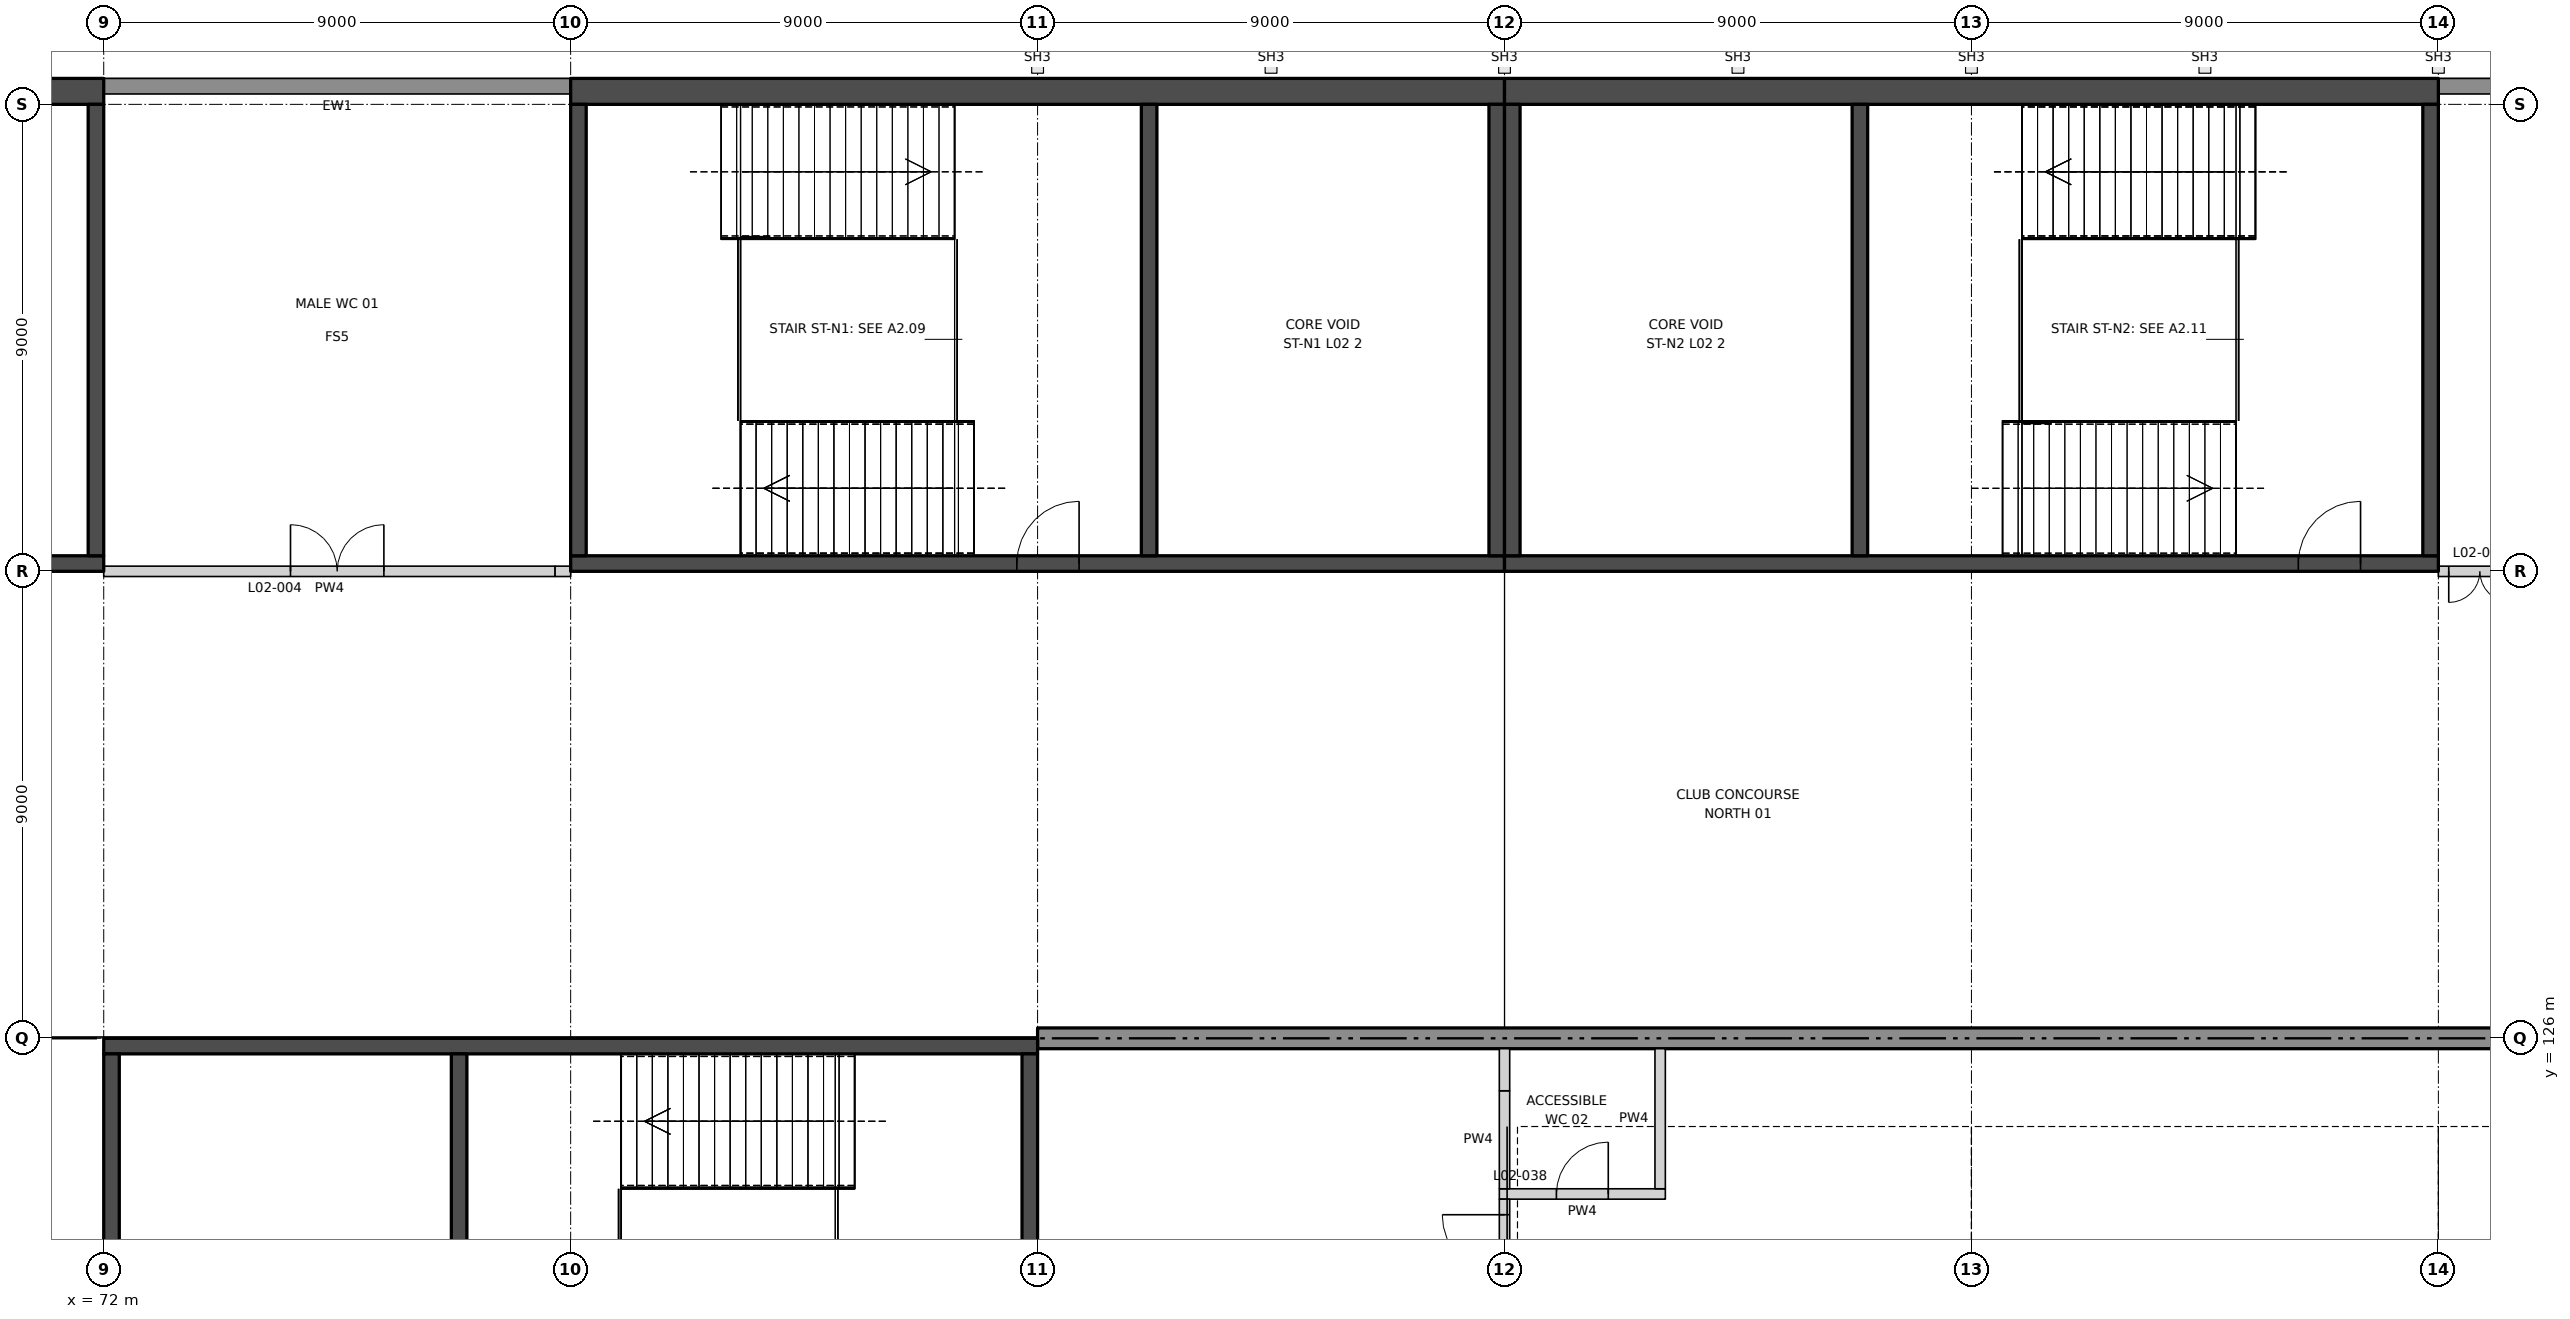
"""IFC4 building model, lengths in metres.
Left out: names, types, materials, properties, quantities, classifications, styles, units other than length and angle.
Written with IfcOpenShell. Run it as: python <this file> out.ifc"""

import sys

from ifc_helpers import new_model, si_unit, direction, frame, frame_2d, origin, place, context, subcontext, project, spatial, polyline, rectangle, outline, extrude, element, fill, save


model = new_model("IFC4")
c1 = context("Model", 3, precision=1e-05, world=origin(), true_north=direction((0.0, 1.0)))
c2 = subcontext(c1, "Body", "Model", "MODEL_VIEW")
j1 = project(units=[si_unit("LENGTHUNIT", "METRE"), si_unit("PLANEANGLEUNIT", "RADIAN")], contexts=[c1])
p1 = place(None, origin())
s1 = spatial("IfcSite", under=j1, at=p1, CompositionType="ELEMENT")
p2 = place(p1, origin())
s2 = spatial("IfcBuilding", under=s1, at=p2, CompositionType="ELEMENT")
p3 = place(p2, frame((0.0, 0.0, 11.5)))
s3 = spatial("IfcBuildingStorey", under=s2, at=p3, CompositionType="ELEMENT", Elevation=11.5)
p4 = place(p3, frame((171.0, 126.0, 0.0), z_axis=(0.0, 0.0, 1.0), x_axis=(-1.0, 0.0, 0.0)))
e1 = element("IfcWall", 1, at=p4, inside=s3, PredefinedType="SOLIDWALL", context=c2, shape_type="SweptSolid", body=[
    extrude(rectangle(XDim=81.0, YDim=0.4, at=frame_2d((40.5, 0.0))), origin(), (0.0, 0.0, 1.0), 10.5),
])
p5 = place(p3, frame((98.9, 123.0, 0.0), z_axis=(0.0, 0.0, 1.0), x_axis=(1.0, 0.0, 0.0)))
e2 = element("IfcWall", 2, at=p5, inside=s3, PredefinedType="PARTITIONING", context=c2, shape_type="SweptSolid", body=[
    extrude(outline(polyline([(0.0, 0.0), (3.2, 0.0), (3.2, 9.508), (0.457, 9.508), (0.0, 10.5), (0.0, 0.0)])), frame((0.0, 0.1, 0.0), z_axis=(0.0, -1.0, 0.0), x_axis=(1.0, 0.0, 0.0)), (0.0, 0.0, 1.0), 0.2),
])
p6 = place(p5, frame((1.1, 0.0, 0.0)))
e3 = element("IfcOpeningElement", 3, at=p6, cuts=e2, PredefinedType="OPENING", context=c2, shape_type="SweptSolid", body=[
    extrude(rectangle(XDim=1.0, YDim=2.1, at=frame_2d((0.5, 1.05))), frame((0.0, 0.11, 0.0), z_axis=(0.0, -1.0, 0.0), x_axis=(1.0, 0.0, 0.0)), (0.0, 0.0, 1.0), 0.22),
])
p7 = place(p3, frame((72.0, 135.0, 0.0), z_axis=(0.0, 0.0, 1.0), x_axis=(1.0, 0.0, 0.0)))
e4 = element("IfcWall", 4, at=p7, inside=s3, PredefinedType="PARTITIONING", context=c2, shape_type="SweptSolid", body=[
    extrude(rectangle(XDim=8.7, YDim=0.2, at=frame_2d((4.35, 0.0))), origin(), (0.0, 0.0, 1.0), 9.15),
])
p8 = place(p7, frame((3.6, 0.0, 0.0)))
e5 = element("IfcOpeningElement", 5, at=p8, cuts=e4, PredefinedType="OPENING", context=c2, shape_type="SweptSolid", body=[
    extrude(rectangle(XDim=1.8, YDim=2.1, at=frame_2d((0.9, 1.05))), frame((0.0, 0.11, 0.0), z_axis=(0.0, -1.0, 0.0), x_axis=(1.0, 0.0, 0.0)), (0.0, 0.0, 1.0), 0.22),
])
p9 = place(p3, frame((117.0, 135.0, 0.0), z_axis=(0.0, 0.0, 1.0), x_axis=(1.0, 0.0, 0.0)))
e6 = element("IfcWall", 6, at=p9, inside=s3, PredefinedType="PARTITIONING", context=c2, shape_type="SweptSolid", body=[
    extrude(rectangle(XDim=8.6, YDim=0.2, at=frame_2d((4.3, 0.0))), origin(), (0.0, 0.0, 1.0), 9.25),
])
p10 = place(p9, frame((0.2, 0.0, 0.0)))
e7 = element("IfcOpeningElement", 7, at=p10, cuts=e6, PredefinedType="OPENING", context=c2, shape_type="SweptSolid", body=[
    extrude(rectangle(XDim=1.2, YDim=2.1, at=frame_2d((0.6, 1.05))), frame((0.0, 0.11, 0.0), z_axis=(0.0, -1.0, 0.0), x_axis=(1.0, 0.0, 0.0)), (0.0, 0.0, 1.0), 0.22),
])
p11 = place(p3, frame((99.0, 121.1, 0.0), z_axis=(0.0, 0.0, 1.0), x_axis=(0.0, 1.0, 0.0)))
e8 = element("IfcWall", 8, at=p11, inside=s3, PredefinedType="PARTITIONING", context=c2, shape_type="SweptSolid", body=[
    extrude(rectangle(XDim=1.8, YDim=0.2, at=frame_2d((0.9, 0.0))), origin(), (0.0, 0.0, 1.0), 4.439),
])
p12 = place(p11, frame((0.3, 0.0, 0.0)))
e9 = element("IfcOpeningElement", 9, at=p12, cuts=e8, PredefinedType="OPENING", context=c2, shape_type="SweptSolid", body=[
    extrude(rectangle(XDim=1.2, YDim=2.1, at=frame_2d((0.6, 1.05))), frame((0.0, 0.11, 0.0), z_axis=(0.0, -1.0, 0.0), x_axis=(1.0, 0.0, 0.0)), (0.0, 0.0, 1.0), 0.22),
])
p13 = place(p3, frame((99.0, 123.1, 0.0), z_axis=(0.0, 0.0, 1.0), x_axis=(0.0, 1.0, 0.0)))
e10 = element("IfcWall", 10, at=p13, inside=s3, PredefinedType="PARTITIONING", context=c2, shape_type="SweptSolid", body=[
    extrude(rectangle(XDim=1.889, YDim=0.2, at=frame_2d((0.944, 0.0))), origin(), (0.0, 0.0, 1.0), 4.439),
])
p14 = place(p3, frame((102.0, 123.1, 0.0), z_axis=(0.0, 0.0, 1.0), x_axis=(0.0, 1.0, 0.0)))
e11 = element("IfcWall", 11, at=p14, inside=s3, PredefinedType="PARTITIONING", context=c2, shape_type="SweptSolid", body=[
    extrude(outline(polyline([(0.0, 0.0), (2.7, 0.0), (2.7, 10.5), (1.35, 10.5), (0.9, 10.133), (0.0, 9.57), (0.0, 0.0)])), frame((0.0, 0.1, 0.0), z_axis=(0.0, -1.0, 0.0), x_axis=(1.0, 0.0, 0.0)), (0.0, 0.0, 1.0), 0.2),
])
p15 = place(p3, frame((81.0, 144.35, 0.0), z_axis=(0.0, 0.0, 1.0), x_axis=(-1.0, 0.0, 0.0)))
e12 = element("IfcWall", 12, at=p15, inside=s3, PredefinedType="SOLIDWALL", context=c2, shape_type="SweptSolid", body=[
    extrude(rectangle(XDim=9.0, YDim=0.3, at=frame_2d((4.5, 0.0))), origin(), (0.0, 0.0, 1.0), 10.5),
])
p16 = place(p3, frame((125.55, 144.35, 0.0), z_axis=(0.0, 0.0, 1.0), x_axis=(-1.0, 0.0, 0.0)))
e13 = element("IfcWall", 13, at=p16, inside=s3, PredefinedType="SOLIDWALL", context=c2, shape_type="SweptSolid", body=[
    extrude(rectangle(XDim=8.55, YDim=0.3, at=frame_2d((4.275, 0.0))), origin(), (0.0, 0.0, 1.0), 10.5),
])
p17 = place(p3, frame((81.0, 135.15, 0.0), z_axis=(0.0, 0.0, 1.0), x_axis=(1.0, 0.0, 0.0)))
e14 = element("IfcWall", 14, at=p17, inside=s3, PredefinedType="SHEAR", context=c2, shape_type="SweptSolid", body=[
    extrude(rectangle(XDim=18.0, YDim=0.3, at=frame_2d((9.0, 0.0))), origin(), (0.0, 0.0, 1.0), 10.5),
])
p18 = place(p17, frame((8.6, 0.0, 0.0)))
e15 = element("IfcOpeningElement", 15, at=p18, cuts=e14, PredefinedType="OPENING", context=c2, shape_type="SweptSolid", body=[
    extrude(rectangle(XDim=1.2, YDim=2.1, at=frame_2d((0.6, 1.05))), frame((0.0, 0.16, 0.0), z_axis=(0.0, -1.0, 0.0), x_axis=(1.0, 0.0, 0.0)), (0.0, 0.0, 1.0), 0.32),
])
p19 = place(p3, frame((81.0, 144.25, 0.0), z_axis=(0.0, 0.0, 1.0), x_axis=(1.0, 0.0, 0.0)))
e16 = element("IfcWall", 16, at=p19, inside=s3, PredefinedType="SHEAR", context=c2, shape_type="SweptSolid", body=[
    extrude(rectangle(XDim=18.0, YDim=0.5, at=frame_2d((9.0, 0.0))), origin(), (0.0, 0.0, 1.0), 10.5),
])
for number, where, z_axis, x_axis in (
    (17, (81.15, 135.3, 0.0), (0.0, 0.0, 1.0), (0.0, 1.0, 0.0)),
    (18, (98.85, 135.3, 0.0), (0.0, 0.0, 1.0), (0.0, 1.0, 0.0)),
    (19, (92.15, 135.3, 0.0), (0.0, 0.0, 1.0), (0.0, 1.0, 0.0)),
):
    element("IfcWall", number, at=place(p3, frame(where, z_axis=z_axis, x_axis=x_axis)), inside=s3, PredefinedType="SHEAR", context=c2, shape_type="SweptSolid", body=[
        extrude(rectangle(XDim=8.7, YDim=0.3, at=frame_2d((4.35, 0.0))), origin(), (0.0, 0.0, 1.0), 10.5),
    ])
p20 = place(p3, frame((117.0, 135.15, 0.0), z_axis=(0.0, 0.0, 1.0), x_axis=(-1.0, 0.0, 0.0)))
e20 = element("IfcWall", 20, at=p20, inside=s3, PredefinedType="SHEAR", context=c2, shape_type="SweptSolid", body=[
    extrude(rectangle(XDim=18.0, YDim=0.3, at=frame_2d((9.0, 0.0))), origin(), (0.0, 0.0, 1.0), 10.5),
])
p21 = place(p20, frame((1.5, 0.0, 0.0)))
e21 = element("IfcOpeningElement", 21, at=p21, cuts=e20, PredefinedType="OPENING", context=c2, shape_type="SweptSolid", body=[
    extrude(rectangle(XDim=1.2, YDim=2.1, at=frame_2d((0.6, 1.05))), frame((0.0, 0.16, 0.0), z_axis=(0.0, -1.0, 0.0), x_axis=(1.0, 0.0, 0.0)), (0.0, 0.0, 1.0), 0.32),
])
p22 = place(p3, frame((117.0, 144.25, 0.0), z_axis=(0.0, 0.0, 1.0), x_axis=(-1.0, 0.0, 0.0)))
e22 = element("IfcWall", 22, at=p22, inside=s3, PredefinedType="SHEAR", context=c2, shape_type="SweptSolid", body=[
    extrude(rectangle(XDim=18.0, YDim=0.5, at=frame_2d((9.0, 0.0))), origin(), (0.0, 0.0, 1.0), 10.5),
])
for number, where, z_axis, x_axis in (
    (23, (116.85, 135.3, 0.0), (0.0, 0.0, 1.0), (0.0, 1.0, 0.0)),
    (24, (99.15, 135.3, 0.0), (0.0, 0.0, 1.0), (0.0, 1.0, 0.0)),
    (25, (105.85, 135.3, 0.0), (0.0, 0.0, 1.0), (0.0, 1.0, 0.0)),
):
    element("IfcWall", number, at=place(p3, frame(where, z_axis=z_axis, x_axis=x_axis)), inside=s3, PredefinedType="SHEAR", context=c2, shape_type="SweptSolid", body=[
        extrude(rectangle(XDim=8.7, YDim=0.3, at=frame_2d((4.35, 0.0))), origin(), (0.0, 0.0, 1.0), 10.5),
    ])
p23 = place(p3, frame((72.0, 135.15, 0.0), z_axis=(0.0, 0.0, 1.0), x_axis=(-1.0, 0.0, 0.0)))
e26 = element("IfcWall", 26, at=p23, inside=s3, PredefinedType="SHEAR", context=c2, shape_type="SweptSolid", body=[
    extrude(rectangle(XDim=18.0, YDim=0.3, at=frame_2d((9.0, 0.0))), origin(), (0.0, 0.0, 1.0), 10.5),
])
p24 = place(p23, frame((8.6, 0.0, 0.0)))
e27 = element("IfcOpeningElement", 27, at=p24, cuts=e26, PredefinedType="OPENING", context=c2, shape_type="SweptSolid", body=[
    extrude(rectangle(XDim=1.2, YDim=2.1, at=frame_2d((0.6, 1.05))), frame((0.0, 0.16, 0.0), z_axis=(0.0, -1.0, 0.0), x_axis=(1.0, 0.0, 0.0)), (0.0, 0.0, 1.0), 0.32),
])
p25 = place(p3, frame((72.0, 144.25, 0.0), z_axis=(0.0, 0.0, 1.0), x_axis=(-1.0, 0.0, 0.0)))
e28 = element("IfcWall", 28, at=p25, inside=s3, PredefinedType="SHEAR", context=c2, shape_type="SweptSolid", body=[
    extrude(rectangle(XDim=18.0, YDim=0.5, at=frame_2d((9.0, 0.0))), origin(), (0.0, 0.0, 1.0), 10.5),
])
p26 = place(p3, frame((71.85, 135.3, 0.0), z_axis=(0.0, 0.0, 1.0), x_axis=(0.0, 1.0, 0.0)))
e29 = element("IfcWall", 29, at=p26, inside=s3, PredefinedType="SHEAR", context=c2, shape_type="SweptSolid", body=[
    extrude(rectangle(XDim=8.7, YDim=0.3, at=frame_2d((4.35, 0.0))), origin(), (0.0, 0.0, 1.0), 10.5),
])
p27 = place(p3, frame((90.0, 125.85, 0.0), z_axis=(0.0, 0.0, 1.0), x_axis=(-1.0, 0.0, 0.0)))
e30 = element("IfcWall", 30, at=p27, inside=s3, PredefinedType="SHEAR", context=c2, shape_type="SweptSolid", body=[
    extrude(rectangle(XDim=18.0, YDim=0.3, at=frame_2d((9.0, 0.0))), origin(), (0.0, 0.0, 1.0), 10.5),
])
for number, where, z_axis, x_axis in (
    (31, (89.85, 117.3, 0.0), (0.0, 0.0, 1.0), (0.0, 1.0, 0.0)),
    (32, (72.15, 117.3, 0.0), (0.0, 0.0, 1.0), (0.0, 1.0, 0.0)),
    (33, (78.85, 117.3, 0.0), (0.0, 0.0, 1.0), (0.0, 1.0, 0.0)),
):
    element("IfcWall", number, at=place(p3, frame(where, z_axis=z_axis, x_axis=x_axis)), inside=s3, PredefinedType="SHEAR", context=c2, shape_type="SweptSolid", body=[
        extrude(rectangle(XDim=8.4, YDim=0.3, at=frame_2d((4.2, 0.0))), origin(), (0.0, 0.0, 1.0), 10.5),
    ])
p28 = place(p3, frame((80.7, 135.0, 0.0), z_axis=(0.0, 0.0, 1.0), x_axis=(1.0, 0.0, 0.0)))
e34 = element("IfcWall", 34, at=p28, inside=s3, PredefinedType="PARTITIONING", context=c2, shape_type="SweptSolid", body=[
    extrude(rectangle(XDim=0.3, YDim=0.2, at=frame_2d((0.15, 0.0))), origin(), (0.0, 0.0, 1.0), 10.5),
])
p29 = place(p3, frame((99.0, 124.989, 0.0), z_axis=(0.0, 0.0, 1.0), x_axis=(0.0, 1.0, 0.0)))
e35 = element("IfcWall", 35, at=p29, inside=s3, PredefinedType="PARTITIONING", context=c2, shape_type="SweptSolid", body=[
    extrude(rectangle(XDim=0.811, YDim=0.2, at=frame_2d((0.406, 0.0))), origin(), (0.0, 0.0, 1.0), 9.15),
])
p30 = place(p8, origin())
e36 = element("IfcDoor", 36, at=p30, inside=s3, OperationType="DOUBLE_DOOR_DOUBLE_SWING", PredefinedType="DOOR", context=c2, shape_type="SweptSolid", body=[
    extrude(rectangle(XDim=1.8, YDim=2.1, at=frame_2d((0.9, 1.05))), frame((0.0, 0.025, 0.0), z_axis=(0.0, -1.0, 0.0), x_axis=(1.0, 0.0, 0.0)), (0.0, 0.0, 1.0), 0.05),
])
fill(e5, e36)
p31 = place(p6, origin())
e37 = element("IfcDoor", 37, at=p31, inside=s3, OperationType="SINGLE_SWING_RIGHT", PredefinedType="DOOR", context=c2, shape_type="SweptSolid", body=[
    extrude(rectangle(XDim=1.0, YDim=2.1, at=frame_2d((0.5, 1.05))), frame((0.0, 0.025, 0.0), z_axis=(0.0, -1.0, 0.0), x_axis=(1.0, 0.0, 0.0)), (0.0, 0.0, 1.0), 0.05),
])
fill(e3, e37)
p32 = place(p12, origin())
e38 = element("IfcDoor", 38, at=p32, inside=s3, OperationType="SINGLE_SWING_RIGHT", PredefinedType="DOOR", context=c2, shape_type="SweptSolid", body=[
    extrude(rectangle(XDim=1.2, YDim=2.1, at=frame_2d((0.6, 1.05))), frame((0.0, 0.025, 0.0), z_axis=(0.0, -1.0, 0.0), x_axis=(1.0, 0.0, 0.0)), (0.0, 0.0, 1.0), 0.05),
])
fill(e9, e38)
p33 = place(p10, frame((1.2, 0.0, 0.0), z_axis=(0.0, 0.0, 1.0), x_axis=(-1.0, 0.0, 0.0)))
e39 = element("IfcDoor", 39, at=p33, inside=s3, OperationType="DOUBLE_DOOR_DOUBLE_SWING", PredefinedType="DOOR", context=c2, shape_type="SweptSolid", body=[
    extrude(rectangle(XDim=1.2, YDim=2.1, at=frame_2d((0.6, 1.05))), frame((0.0, 0.025, 0.0), z_axis=(0.0, -1.0, 0.0), x_axis=(1.0, 0.0, 0.0)), (0.0, 0.0, 1.0), 0.05),
])
fill(e7, e39)
p34 = place(p18, origin())
e40 = element("IfcDoor", 40, at=p34, inside=s3, OperationType="SINGLE_SWING_RIGHT", PredefinedType="DOOR", context=c2, shape_type="SweptSolid", body=[
    extrude(rectangle(XDim=1.2, YDim=2.1, at=frame_2d((0.6, 1.05))), frame((0.0, 0.025, 0.0), z_axis=(0.0, -1.0, 0.0), x_axis=(1.0, 0.0, 0.0)), (0.0, 0.0, 1.0), 0.05),
])
fill(e15, e40)
p35 = place(p21, frame((1.2, 0.0, 0.0), z_axis=(0.0, 0.0, 1.0), x_axis=(-1.0, 0.0, 0.0)))
e41 = element("IfcDoor", 41, at=p35, inside=s3, OperationType="SINGLE_SWING_RIGHT", PredefinedType="DOOR", context=c2, shape_type="SweptSolid", body=[
    extrude(rectangle(XDim=1.2, YDim=2.1, at=frame_2d((0.6, 1.05))), frame((0.0, 0.025, 0.0), z_axis=(0.0, -1.0, 0.0), x_axis=(1.0, 0.0, 0.0)), (0.0, 0.0, 1.0), 0.05),
])
fill(e21, e41)
save(model, sys.argv[1])
